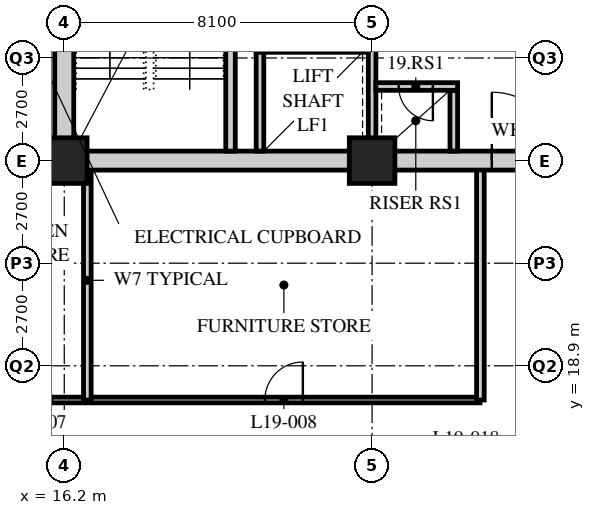
"""IFC4 building model, lengths in metres.
Left out: names, types, materials, properties, quantities, classifications, styles, units other than length and angle.
Written with IfcOpenShell. Run it as: python <this file> out.ifc"""

import sys

from ifc_helpers import new_model, si_unit, direction, frame, frame_2d, origin, origin_2d, place, context, subcontext, project, spatial, rectangle, hollow_rectangle, extrude, element, fill, save


model = new_model("IFC4")
c1 = context("Model", 3, precision=1e-05, world=origin(), true_north=direction((0.0, 1.0)))
c2 = subcontext(c1, "Body", "Model", "MODEL_VIEW")
j1 = project(units=[si_unit("LENGTHUNIT", "METRE"), si_unit("PLANEANGLEUNIT", "RADIAN")], contexts=[c1])
p1 = place(None, origin())
s1 = spatial("IfcSite", under=j1, at=p1, CompositionType="ELEMENT")
p2 = place(p1, origin())
s2 = spatial("IfcBuilding", under=s1, at=p2, CompositionType="ELEMENT")
p3 = place(p2, frame((0.0, 0.0, 77.2)))
s3 = spatial("IfcBuildingStorey", under=s2, at=p3, CompositionType="ELEMENT", Elevation=77.2)
for number, where, z_axis, x_axis in (
    (1, (16.2, 24.3, 0.0), (0.0, 0.0, 1.0), (1.0, 0.0, 0.0)),
    (2, (24.3, 24.3, 0.0), (0.0, 0.0, 1.0), (1.0, 0.0, 0.0)),
):
    element("IfcColumn", number, at=place(p3, frame(where, z_axis=z_axis, x_axis=x_axis)), inside=s3, PredefinedType="COLUMN", context=c2, shape_type="SweptSolid", body=[
        extrude(hollow_rectangle(XDim=1.2, YDim=1.2, WallThickness=0.12, at=origin_2d()), origin(), (0.0, 0.0, 1.0), 3.4),
    ])
p4 = place(p3, frame((13.95, 18.0, 0.0), z_axis=(0.0, 0.0, 1.0), x_axis=(1.0, 0.0, 0.0)))
e3 = element("IfcWall", 3, at=p4, inside=s3, PredefinedType="PARTITIONING", context=c2, shape_type="SweptSolid", body=[
    extrude(rectangle(XDim=13.19, YDim=0.15, at=frame_2d((6.595, 0.0))), origin(), (0.0, 0.0, 1.0), 3.19),
])
p5 = place(p4, frame((0.929, 0.0, 0.0)))
e4 = element("IfcOpeningElement", 4, at=p5, cuts=e3, PredefinedType="OPENING", context=c2, shape_type="SweptSolid", body=[
    extrude(rectangle(XDim=1.0, YDim=2.1, at=frame_2d((0.5, 1.05))), frame((0.0, 0.085, 0.0), z_axis=(0.0, -1.0, 0.0), x_axis=(1.0, 0.0, 0.0)), (0.0, 0.0, 1.0), 0.17),
])
p6 = place(p4, frame((7.529, 0.0, 0.0)))
e5 = element("IfcOpeningElement", 5, at=p6, cuts=e3, PredefinedType="OPENING", context=c2, shape_type="SweptSolid", body=[
    extrude(rectangle(XDim=1.0, YDim=2.1, at=frame_2d((0.5, 1.05))), frame((0.0, 0.085, 0.0), z_axis=(0.0, -1.0, 0.0), x_axis=(1.0, 0.0, 0.0)), (0.0, 0.0, 1.0), 0.17),
])
for number, where, z_axis, x_axis in (
    (6, (16.807, 18.0, 0.0), (0.0, 0.0, 1.0), (0.0, 1.0, 0.0)),
    (7, (27.15, 18.0, 0.0), (0.0, 0.0, 1.0), (0.0, 1.0, 0.0)),
):
    element("IfcWall", number, at=place(p3, frame(where, z_axis=z_axis, x_axis=x_axis)), inside=s3, PredefinedType="SOLIDWALL", context=c2, shape_type="SweptSolid", body=[
        extrude(rectangle(XDim=6.3, YDim=0.2, at=frame_2d((3.15, 0.0))), origin(), (0.0, 0.0, 1.0), 3.19),
    ])
p7 = place(p3, frame((13.95, 24.3, 0.0), z_axis=(0.0, 0.0, 1.0), x_axis=(1.0, 0.0, 0.0)))
e8 = element("IfcWall", 8, at=p7, inside=s3, PredefinedType="SOLIDWALL", context=c2, shape_type="SweptSolid", body=[
    extrude(rectangle(XDim=2.25, YDim=0.2, at=frame_2d((1.125, 0.0))), origin(), (0.0, 0.0, 1.0), 2.428),
])
p8 = place(p3, frame((15.95, 24.3, 0.0), z_axis=(0.0, 0.0, 1.0), x_axis=(1.0, 0.0, 0.0)))
e9 = element("IfcWall", 9, at=p8, inside=s3, PredefinedType="SOLIDWALL", context=c2, shape_type="SweptSolid", body=[
    extrude(rectangle(XDim=24.8, YDim=0.5, at=frame_2d((12.4, 0.0))), origin(), (0.0, 0.0, 1.0), 2.428),
])
p9 = place(p8, frame((11.5, 0.0, 0.0)))
e10 = element("IfcOpeningElement", 10, at=p9, cuts=e9, PredefinedType="OPENING", context=c2, shape_type="SweptSolid", body=[
    extrude(rectangle(XDim=1.8, YDim=2.4, at=frame_2d((0.9, 1.2))), frame((0.0, 0.26, 0.0), z_axis=(0.0, -1.0, 0.0), x_axis=(1.0, 0.0, 0.0)), (0.0, 0.0, 1.0), 0.52),
])
p10 = place(p3, frame((16.2, 24.55, 0.0), z_axis=(0.0, 0.0, 1.0), x_axis=(0.0, 1.0, 0.0)))
e11 = element("IfcWall", 11, at=p10, inside=s3, PredefinedType="SOLIDWALL", context=c2, shape_type="SweptSolid", body=[
    extrude(rectangle(XDim=15.7, YDim=0.5, at=frame_2d((7.85, 0.0))), origin(), (0.0, 0.0, 1.0), 2.428),
])
p11 = place(p3, frame((24.3, 24.55, 0.0), z_axis=(0.0, 0.0, 1.0), x_axis=(0.0, 1.0, 0.0)))
e12 = element("IfcWall", 12, at=p11, inside=s3, PredefinedType="SOLIDWALL", context=c2, shape_type="SweptSolid", body=[
    extrude(rectangle(XDim=7.75, YDim=0.2, at=frame_2d((3.875, 0.0))), origin(), (0.0, 0.0, 1.0), 2.578),
])
p12 = place(p11, frame((4.6, 0.0, 0.0)))
e13 = element("IfcOpeningElement", 13, at=p12, cuts=e12, PredefinedType="OPENING", context=c2, shape_type="SweptSolid", body=[
    extrude(rectangle(XDim=1.2, YDim=2.1, at=frame_2d((0.6, 1.05))), frame((0.0, 0.11, 0.0), z_axis=(0.0, -1.0, 0.0), x_axis=(1.0, 0.0, 0.0)), (0.0, 0.0, 1.0), 0.22),
])
p13 = place(p3, frame((20.575, 24.55, 0.0), z_axis=(0.0, 0.0, 1.0), x_axis=(0.0, 1.0, 0.0)))
e14 = element("IfcWall", 14, at=p13, inside=s3, PredefinedType="SOLIDWALL", context=c2, shape_type="SweptSolid", body=[
    extrude(rectangle(XDim=7.75, YDim=0.25, at=frame_2d((3.875, 0.0))), origin(), (0.0, 0.0, 1.0), 3.19),
])
p14 = place(p13, frame((6.2, 0.0, 0.0)))
e15 = element("IfcOpeningElement", 15, at=p14, cuts=e14, PredefinedType="OPENING", context=c2, shape_type="SweptSolid", body=[
    extrude(rectangle(XDim=1.2, YDim=2.1, at=frame_2d((0.6, 1.05))), frame((0.0, 0.135, 0.0), z_axis=(0.0, -1.0, 0.0), x_axis=(1.0, 0.0, 0.0)), (0.0, 0.0, 1.0), 0.27),
])
p15 = place(p3, frame((21.35, 24.55, 0.0), z_axis=(0.0, 0.0, 1.0), x_axis=(0.0, 1.0, 0.0)))
e16 = element("IfcWall", 16, at=p15, inside=s3, PredefinedType="SOLIDWALL", context=c2, shape_type="SweptSolid", body=[
    extrude(rectangle(XDim=2.6, YDim=0.2, at=frame_2d((1.3, 0.0))), origin(), (0.0, 0.0, 1.0), 3.19),
])
p16 = place(p3, frame((26.45, 24.55, 0.0), z_axis=(0.0, 0.0, 1.0), x_axis=(0.0, 1.0, 0.0)))
e17 = element("IfcWall", 17, at=p16, inside=s3, PredefinedType="SOLIDWALL", context=c2, shape_type="SweptSolid", body=[
    extrude(rectangle(XDim=1.6, YDim=0.2, at=frame_2d((0.8, 0.0))), origin(), (0.0, 0.0, 1.0), 3.19),
])
p17 = place(p3, frame((24.4, 26.25, 0.0), z_axis=(0.0, 0.0, 1.0), x_axis=(1.0, 0.0, 0.0)))
e18 = element("IfcWall", 18, at=p17, inside=s3, PredefinedType="SOLIDWALL", context=c2, shape_type="SweptSolid", body=[
    extrude(rectangle(XDim=2.15, YDim=0.2, at=frame_2d((1.075, 0.0))), origin(), (0.0, 0.0, 1.0), 3.19),
])
p18 = place(p17, frame((0.6, 0.0, 0.0)))
e19 = element("IfcOpeningElement", 19, at=p18, cuts=e18, PredefinedType="OPENING", context=c2, shape_type="SweptSolid", body=[
    extrude(rectangle(XDim=0.9, YDim=2.1, at=frame_2d((0.45, 1.05))), frame((0.0, 0.11, 0.0), z_axis=(0.0, -1.0, 0.0), x_axis=(1.0, 0.0, 0.0)), (0.0, 0.0, 1.0), 0.22),
])
p19 = place(p6, origin())
e20 = element("IfcDoor", 20, at=p19, inside=s3, OperationType="SINGLE_SWING_RIGHT", PredefinedType="DOOR", context=c2, shape_type="SweptSolid", body=[
    extrude(rectangle(XDim=1.0, YDim=2.1, at=frame_2d((0.5, 1.05))), frame((0.0, 0.025, 0.0), z_axis=(0.0, -1.0, 0.0), x_axis=(1.0, 0.0, 0.0)), (0.0, 0.0, 1.0), 0.05),
])
fill(e5, e20)
p20 = place(p18, origin())
e21 = element("IfcDoor", 21, at=p20, inside=s3, OperationType="SINGLE_SWING_LEFT", PredefinedType="DOOR", context=c2, shape_type="SweptSolid", body=[
    extrude(rectangle(XDim=0.9, YDim=2.1, at=frame_2d((0.45, 1.05))), frame((0.0, 0.025, 0.0), z_axis=(0.0, -1.0, 0.0), x_axis=(1.0, 0.0, 0.0)), (0.0, 0.0, 1.0), 0.05),
])
fill(e19, e21)
p21 = place(p9, origin())
e22 = element("IfcDoor", 22, at=p21, inside=s3, OperationType="DOUBLE_DOOR_SINGLE_SWING", PredefinedType="DOOR", context=c2, shape_type="SweptSolid", body=[
    extrude(rectangle(XDim=1.8, YDim=2.4, at=frame_2d((0.9, 1.2))), frame((0.0, 0.025, 0.0), z_axis=(0.0, -1.0, 0.0), x_axis=(1.0, 0.0, 0.0)), (0.0, 0.0, 1.0), 0.05),
])
fill(e10, e22)
save(model, sys.argv[1])
